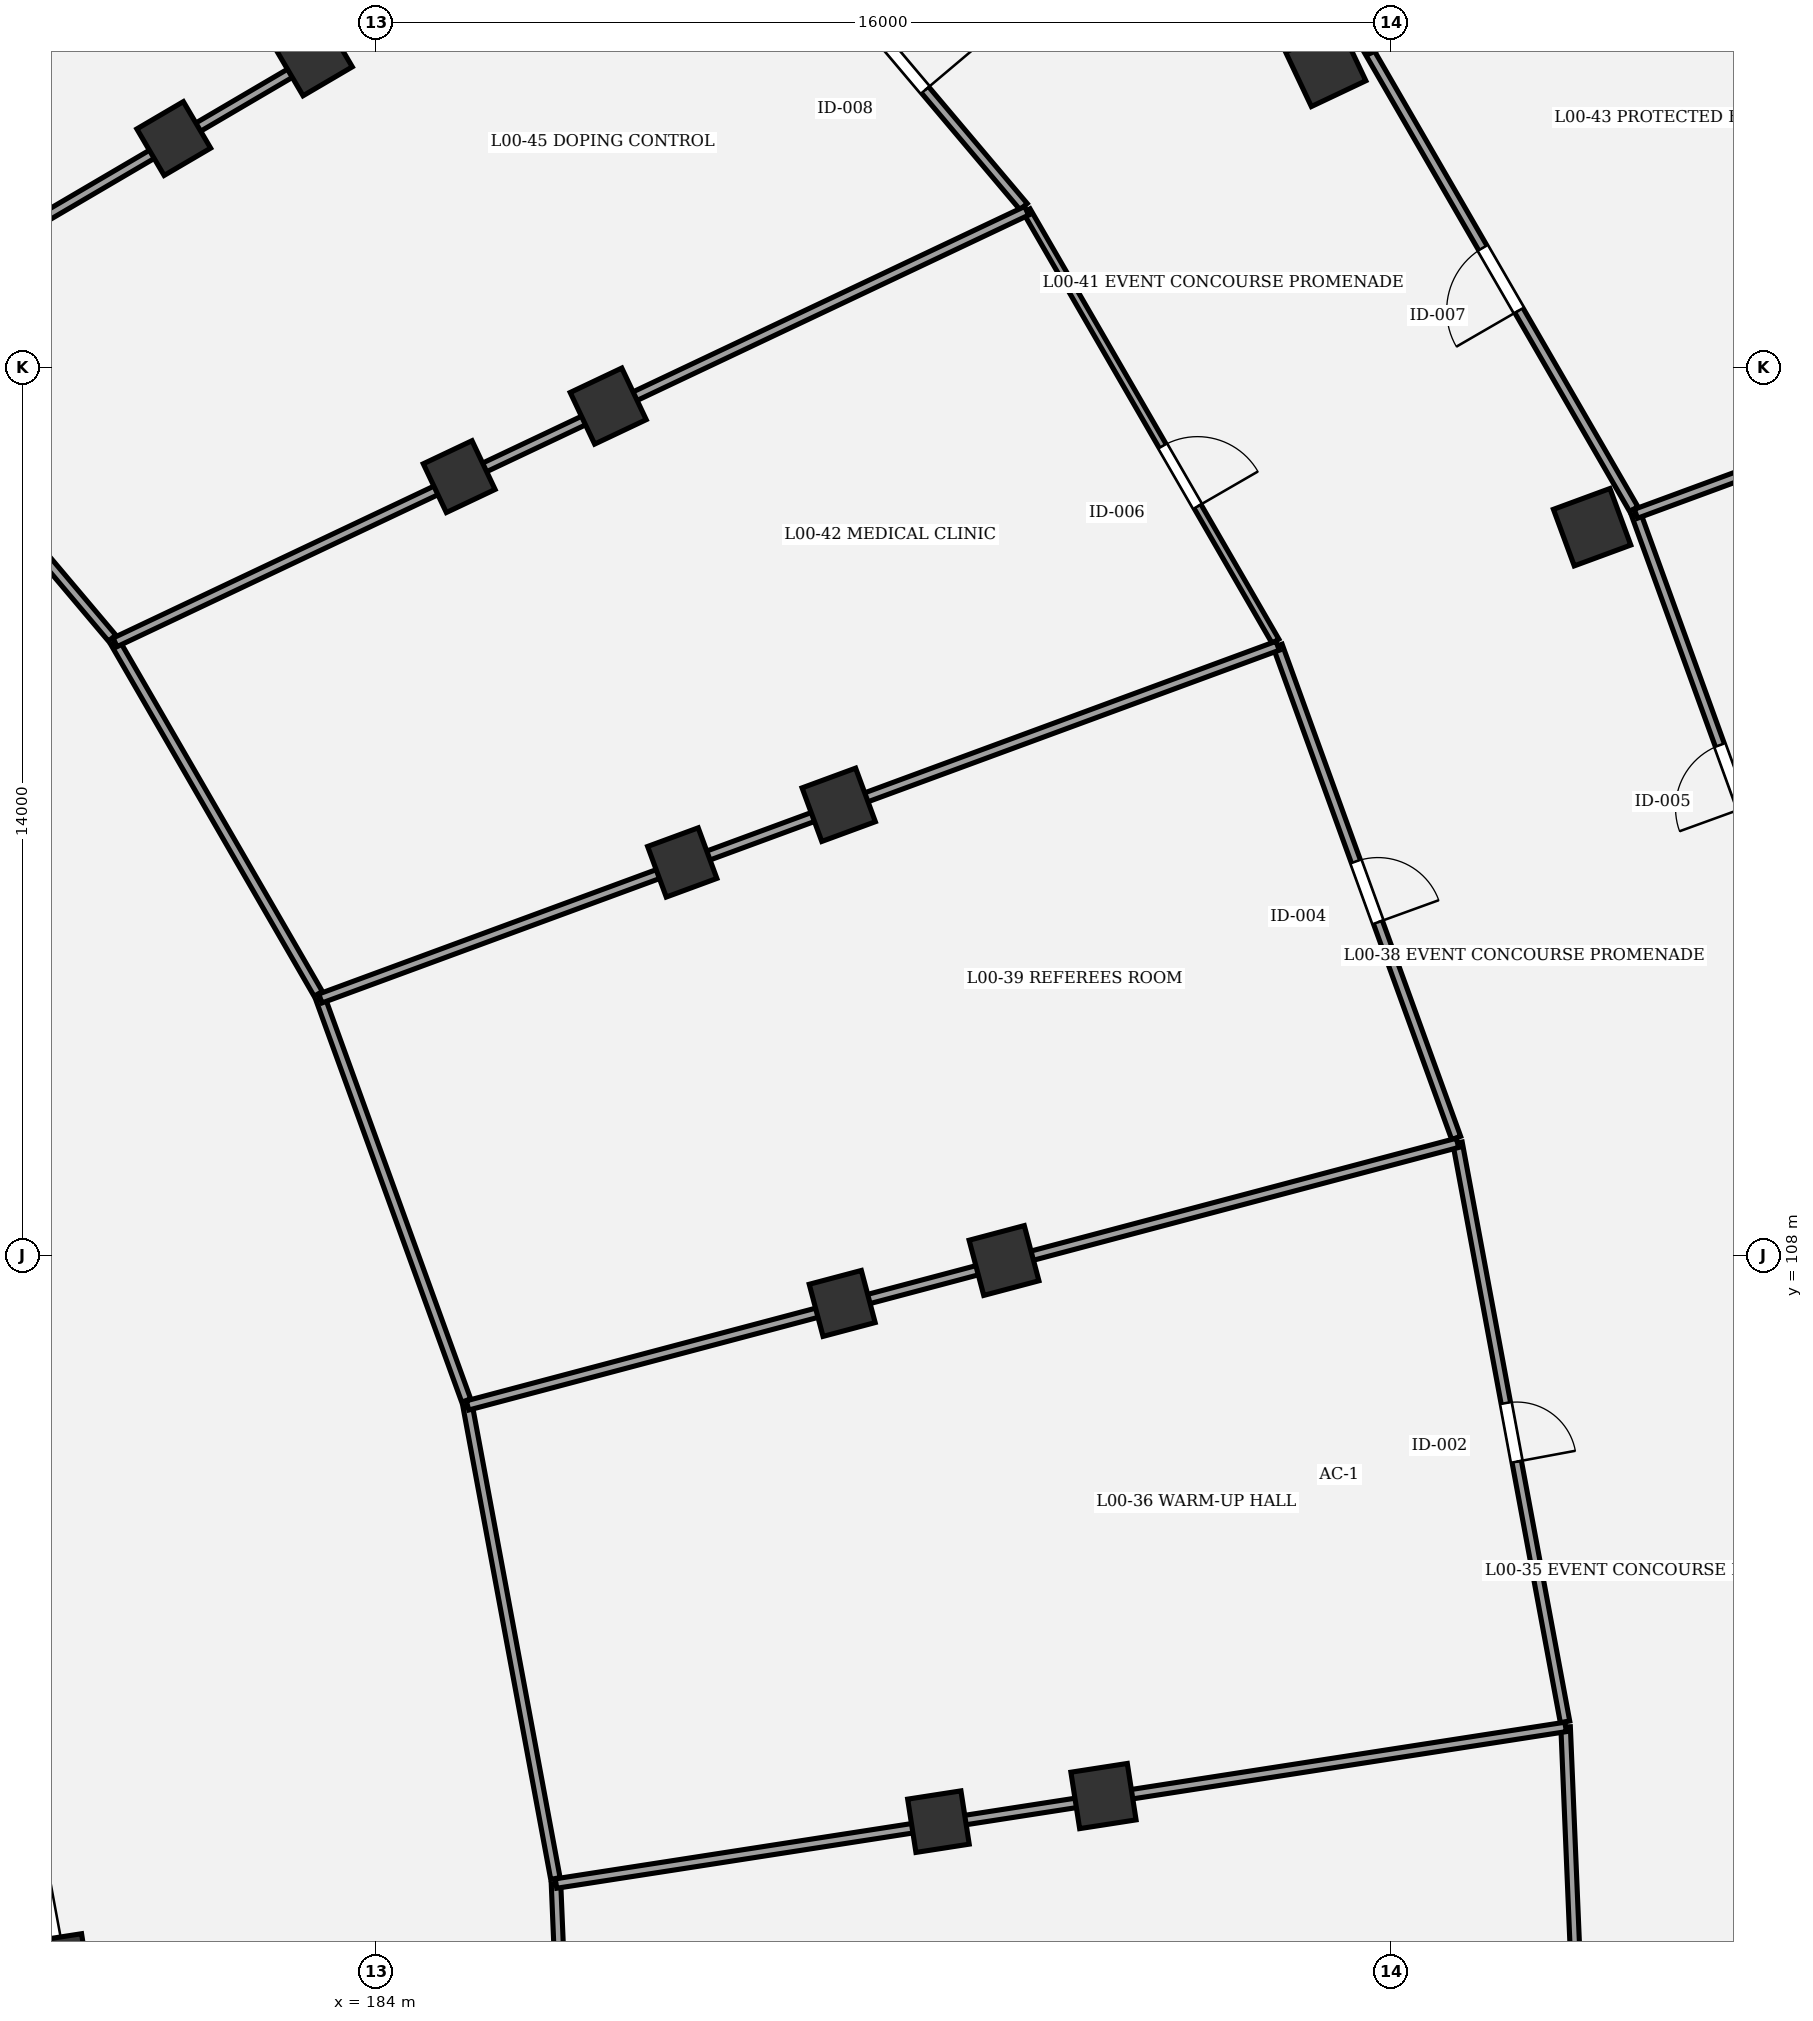
"""IFC4 building model, lengths in metres.
Left out: names, types, materials, properties, quantities, classifications, styles, units other than length and angle.
Written with IfcOpenShell. Run it as: python <this file> out.ifc"""

import sys

from ifc_helpers import new_model, si_unit, direction, frame, frame_2d, origin, origin_2d, place, context, subcontext, project, spatial, rectangle, extrude, element, fill, save


model = new_model("IFC4")
c1 = context("Model", 3, precision=1e-05, world=origin(), true_north=direction((0.0, 1.0)))
c2 = subcontext(c1, "Body", "Model", "MODEL_VIEW")
j1 = project(units=[si_unit("LENGTHUNIT", "METRE"), si_unit("PLANEANGLEUNIT", "RADIAN")], contexts=[c1])
p1 = place(None, origin())
s1 = spatial("IfcSite", under=j1, at=p1, CompositionType="ELEMENT")
p2 = place(p1, origin())
s2 = spatial("IfcBuilding", under=s1, at=p2, CompositionType="ELEMENT")
p3 = place(p2, origin())
s3 = spatial("IfcBuildingStorey", under=s2, at=p3, CompositionType="ELEMENT", Elevation=0.0)
p4 = place(p3, frame((179.088, 96.94, 0.0), z_axis=(0.0, 0.0, 1.0), x_axis=(0.98817491911, 0.153330783737, 0.0)))
e1 = element("IfcColumn", 1, at=p4, inside=s3, PredefinedType="COLUMN", context=c2, shape_type="SweptSolid", body=[
    extrude(rectangle(XDim=0.65, YDim=0.65, at=origin_2d()), origin(), (0.0, 0.0, 1.0), 1.15),
])
p5 = place(p3, frame((192.869, 99.078, 0.0), z_axis=(0.0, 0.0, 1.0), x_axis=(0.98817491911, 0.153330783737, 0.0)))
e2 = element("IfcColumn", 2, at=p5, inside=s3, PredefinedType="COLUMN", context=c2, shape_type="SweptSolid", body=[
    extrude(rectangle(XDim=0.85, YDim=0.85, at=origin_2d()), origin(), (0.0, 0.0, 1.0), 5.4),
])
p6 = place(p3, frame((195.471, 99.482, 0.0), z_axis=(0.0, 0.0, 1.0), x_axis=(0.98817491911, 0.153330783737, 0.0)))
e3 = element("IfcColumn", 3, at=p6, inside=s3, PredefinedType="COLUMN", context=c2, shape_type="SweptSolid", body=[
    extrude(rectangle(XDim=0.9, YDim=0.9, at=origin_2d()), origin(), (0.0, 0.0, 1.0), 5.4),
])
p7 = place(p3, frame((191.352, 107.248, 0.0), z_axis=(0.0, 0.0, 1.0), x_axis=(0.966600102017, 0.256289373133, 0.0)))
e4 = element("IfcColumn", 4, at=p7, inside=s3, PredefinedType="COLUMN", context=c2, shape_type="SweptSolid", body=[
    extrude(rectangle(XDim=0.85, YDim=0.85, at=origin_2d()), origin(), (0.0, 0.0, 1.0), 5.4),
])
p8 = place(p3, frame((193.903, 107.924, 0.0), z_axis=(0.0, 0.0, 1.0), x_axis=(0.966600102017, 0.256289373133, 0.0)))
e5 = element("IfcColumn", 5, at=p8, inside=s3, PredefinedType="COLUMN", context=c2, shape_type="SweptSolid", body=[
    extrude(rectangle(XDim=0.9, YDim=0.9, at=origin_2d()), origin(), (0.0, 0.0, 1.0), 5.4),
])
p9 = place(p3, frame((188.83, 114.199, 0.0), z_axis=(0.0, 0.0, 1.0), x_axis=(0.938372433776, 0.34562577382, 0.0)))
e6 = element("IfcColumn", 6, at=p9, inside=s3, PredefinedType="COLUMN", context=c2, shape_type="SweptSolid", body=[
    extrude(rectangle(XDim=0.85, YDim=0.85, at=origin_2d()), origin(), (0.0, 0.0, 1.0), 5.4),
])
p10 = place(p3, frame((191.297, 115.108, 0.0), z_axis=(0.0, 0.0, 1.0), x_axis=(0.938372433776, 0.34562577382, 0.0)))
e7 = element("IfcColumn", 7, at=p10, inside=s3, PredefinedType="COLUMN", context=c2, shape_type="SweptSolid", body=[
    extrude(rectangle(XDim=0.9, YDim=0.9, at=origin_2d()), origin(), (0.0, 0.0, 1.0), 5.4),
])
p11 = place(p3, frame((203.176, 119.484, 0.0), z_axis=(0.0, 0.0, 1.0), x_axis=(0.938372433776, 0.34562577382, 0.0)))
e8 = element("IfcColumn", 8, at=p11, inside=s3, PredefinedType="COLUMN", context=c2, shape_type="SweptSolid", body=[
    extrude(rectangle(XDim=0.95, YDim=0.95, at=origin_2d()), origin(), (0.0, 0.0, 1.0), 5.4),
])
p12 = place(p3, frame((185.313, 120.281, 0.0), z_axis=(0.0, 0.0, 1.0), x_axis=(0.903858661687, 0.4278311813, 0.0)))
e9 = element("IfcColumn", 9, at=p12, inside=s3, PredefinedType="COLUMN", context=c2, shape_type="SweptSolid", body=[
    extrude(rectangle(XDim=0.85, YDim=0.85, at=origin_2d()), origin(), (0.0, 0.0, 1.0), 5.4),
])
p13 = place(p3, frame((187.663, 121.394, 0.0), z_axis=(0.0, 0.0, 1.0), x_axis=(0.903858661687, 0.4278311813, 0.0)))
e10 = element("IfcColumn", 10, at=p13, inside=s3, PredefinedType="COLUMN", context=c2, shape_type="SweptSolid", body=[
    extrude(rectangle(XDim=0.9, YDim=0.9, at=origin_2d()), origin(), (0.0, 0.0, 1.0), 5.4),
])
p14 = place(p3, frame((198.976, 126.748, 0.0), z_axis=(0.0, 0.0, 1.0), x_axis=(0.903858661687, 0.4278311813, 0.0)))
e11 = element("IfcColumn", 11, at=p14, inside=s3, PredefinedType="COLUMN", context=c2, shape_type="SweptSolid", body=[
    extrude(rectangle(XDim=0.95, YDim=0.95, at=origin_2d()), origin(), (0.0, 0.0, 1.0), 5.4),
])
p15 = place(p3, frame((180.812, 125.611, 0.0), z_axis=(0.0, 0.0, 1.0), x_axis=(0.862513669207, 0.506033764121, 0.0)))
e12 = element("IfcColumn", 12, at=p15, inside=s3, PredefinedType="COLUMN", context=c2, shape_type="SweptSolid", body=[
    extrude(rectangle(XDim=0.85, YDim=0.85, at=origin_2d()), origin(), (0.0, 0.0, 1.0), 5.4),
])
p16 = place(p3, frame((183.012, 126.902, 0.0), z_axis=(0.0, 0.0, 1.0), x_axis=(0.862513669207, 0.506033764121, 0.0)))
e13 = element("IfcColumn", 13, at=p16, inside=s3, PredefinedType="COLUMN", context=c2, shape_type="SweptSolid", body=[
    extrude(rectangle(XDim=0.9, YDim=0.9, at=origin_2d()), origin(), (0.0, 0.0, 1.0), 5.4),
])
p17 = place(p3, frame((202.758, 100.571, 0.0), z_axis=(0.0, 0.0, 1.0), x_axis=(0.041894479342, -0.999122040894, 0.0)))
e14 = element("IfcWall", 14, at=p17, inside=s3, PredefinedType="PARTITIONING", context=c2, shape_type="SweptSolid", body=[
    extrude(rectangle(XDim=13.543, YDim=0.15, at=frame_2d((6.771, 0.0))), origin(), (0.0, 0.0, 1.0), 4.15),
])
p18 = place(p17, frame((6.322, 0.0, 0.0)))
e15 = element("IfcOpeningElement", 15, at=p18, cuts=e14, PredefinedType="OPENING", context=c2, shape_type="SweptSolid", body=[
    extrude(rectangle(XDim=0.9, YDim=2.1, at=frame_2d((0.45, 1.05))), frame((0.0, 0.085, 0.0), z_axis=(0.0, -1.0, 0.0), x_axis=(1.0, 0.0, 0.0)), (0.0, 0.0, 1.0), 0.17),
])
p19 = place(p3, frame((201.053, 109.779, 0.0), z_axis=(0.0, 0.0, 1.0), x_axis=(0.182600545941, -0.983187184936, 0.0)))
e16 = element("IfcWall", 16, at=p19, inside=s3, PredefinedType="PARTITIONING", context=c2, shape_type="SweptSolid", body=[
    extrude(rectangle(XDim=9.284, YDim=0.15, at=frame_2d((4.642, 0.0))), origin(), (0.0, 0.0, 1.0), 4.15),
])
p20 = place(p19, frame((4.172, 0.0, 0.0)))
e17 = element("IfcOpeningElement", 17, at=p20, cuts=e16, PredefinedType="OPENING", context=c2, shape_type="SweptSolid", body=[
    extrude(rectangle(XDim=0.94, YDim=2.1, at=frame_2d((0.47, 1.05))), frame((0.0, 0.085, 0.0), z_axis=(0.0, -1.0, 0.0), x_axis=(1.0, 0.0, 0.0)), (0.0, 0.0, 1.0), 0.17),
])
p21 = place(p3, frame((198.218, 117.615, 0.0), z_axis=(0.0, 0.0, 1.0), x_axis=(0.341044733968, -0.940047067669, 0.0)))
e18 = element("IfcWall", 18, at=p21, inside=s3, PredefinedType="PARTITIONING", context=c2, shape_type="SweptSolid", body=[
    extrude(rectangle(XDim=8.254, YDim=0.15, at=frame_2d((4.127, 0.0))), origin(), (0.0, 0.0, 1.0), 4.15),
])
p22 = place(p21, frame((3.617, 0.0, 0.0)))
e19 = element("IfcOpeningElement", 19, at=p22, cuts=e18, PredefinedType="OPENING", context=c2, shape_type="SweptSolid", body=[
    extrude(rectangle(XDim=1.02, YDim=2.1, at=frame_2d((0.51, 1.05))), frame((0.0, 0.085, 0.0), z_axis=(0.0, -1.0, 0.0), x_axis=(1.0, 0.0, 0.0)), (0.0, 0.0, 1.0), 0.17),
])
p23 = place(p3, frame((206.874, 111.405, 0.0), z_axis=(0.0, 0.0, 1.0), x_axis=(-0.341031741571, 0.940051781149, 0.0)))
e20 = element("IfcWall", 20, at=p23, inside=s3, PredefinedType="PARTITIONING", context=c2, shape_type="SweptSolid", body=[
    extrude(rectangle(XDim=8.82, YDim=0.15, at=frame_2d((4.41, 0.0))), origin(), (0.0, 0.0, 1.0), 4.15),
])
p24 = place(p23, frame((3.88, 0.0, 0.0)))
e21 = element("IfcOpeningElement", 21, at=p24, cuts=e20, PredefinedType="OPENING", context=c2, shape_type="SweptSolid", body=[
    extrude(rectangle(XDim=1.06, YDim=2.1, at=frame_2d((0.53, 1.05))), frame((0.0, 0.085, 0.0), z_axis=(0.0, -1.0, 0.0), x_axis=(1.0, 0.0, 0.0)), (0.0, 0.0, 1.0), 0.17),
])
p25 = place(p3, frame((194.26, 124.472, 0.0), z_axis=(0.0, 0.0, 1.0), x_axis=(0.500584301803, -0.865687794063, 0.0)))
e22 = element("IfcWall", 22, at=p25, inside=s3, PredefinedType="PARTITIONING", context=c2, shape_type="SweptSolid", body=[
    extrude(rectangle(XDim=7.837, YDim=0.125, at=frame_2d((3.918, 0.0))), origin(), (0.0, 0.0, 1.0), 4.15),
])
p26 = place(p25, frame((4.283, 0.0, 0.0)))
e23 = element("IfcOpeningElement", 23, at=p26, cuts=e22, PredefinedType="OPENING", context=c2, shape_type="SweptSolid", body=[
    extrude(rectangle(XDim=1.1, YDim=2.1, at=frame_2d((0.55, 1.05))), frame((0.0, 0.073, 0.0), z_axis=(0.0, -1.0, 0.0), x_axis=(1.0, 0.0, 0.0)), (0.0, 0.0, 1.0), 0.145),
])
p27 = place(p3, frame((203.833, 119.769, 0.0), z_axis=(0.0, 0.0, 1.0), x_axis=(-0.500559280672, 0.865702262059, 0.0)))
e24 = element("IfcWall", 24, at=p27, inside=s3, PredefinedType="PARTITIONING", context=c2, shape_type="SweptSolid", body=[
    extrude(rectangle(XDim=8.375, YDim=0.15, at=frame_2d((4.187, 0.0))), origin(), (0.0, 0.0, 1.0), 4.15),
])
p28 = place(p27, frame((3.617, 0.0, 0.0)))
e25 = element("IfcOpeningElement", 25, at=p28, cuts=e24, PredefinedType="OPENING", context=c2, shape_type="SweptSolid", body=[
    extrude(rectangle(XDim=1.14, YDim=2.1, at=frame_2d((0.57, 1.05))), frame((0.0, 0.085, 0.0), z_axis=(0.0, -1.0, 0.0), x_axis=(1.0, 0.0, 0.0)), (0.0, 0.0, 1.0), 0.17),
])
p29 = place(p3, frame((189.193, 130.482, 0.0), z_axis=(0.0, 0.0, 1.0), x_axis=(0.645180817826, -0.764029915847, 0.0)))
e26 = element("IfcWall", 26, at=p29, inside=s3, PredefinedType="PARTITIONING", context=c2, shape_type="SweptSolid", body=[
    extrude(rectangle(XDim=7.779, YDim=0.15, at=frame_2d((3.89, 0.0))), origin(), (0.0, 0.0, 1.0), 4.15),
])
p30 = place(p29, frame((4.194, 0.0, 0.0)))
e27 = element("IfcOpeningElement", 27, at=p30, cuts=e26, PredefinedType="OPENING", context=c2, shape_type="SweptSolid", body=[
    extrude(rectangle(XDim=1.18, YDim=2.1, at=frame_2d((0.59, 1.05))), frame((0.0, 0.085, 0.0), z_axis=(0.0, -1.0, 0.0), x_axis=(1.0, 0.0, 0.0)), (0.0, 0.0, 1.0), 0.17),
])
p31 = place(p3, frame((187.303, 87.04, 0.0), z_axis=(0.0, 0.0, 1.0), x_axis=(-0.041917617243, 0.999121070424, 0.0)))
e28 = element("IfcWall", 28, at=p31, inside=s3, PredefinedType="PARTITIONING", context=c2, shape_type="SweptSolid", body=[
    extrude(rectangle(XDim=11.072, YDim=0.15, at=frame_2d((5.536, 0.0))), origin(), (0.0, 0.0, 1.0), 4.15),
])
p32 = place(p3, frame((186.839, 98.102, 0.0), z_axis=(0.0, 0.0, 1.0), x_axis=(0.988184353902, 0.153269966734, 0.0)))
e29 = element("IfcWall", 29, at=p32, inside=s3, PredefinedType="PARTITIONING", context=c2, shape_type="SweptSolid", body=[
    extrude(rectangle(XDim=16.109, YDim=0.15, at=frame_2d((8.054, 0.0))), origin(), (0.0, 0.0, 1.0), 4.15),
])
p33 = place(p3, frame((186.83, 98.182, 0.0), z_axis=(0.0, 0.0, 1.0), x_axis=(-0.182622862121, 0.983183040044, 0.0)))
e30 = element("IfcWall", 30, at=p33, inside=s3, PredefinedType="PARTITIONING", context=c2, shape_type="SweptSolid", body=[
    extrude(rectangle(XDim=7.585, YDim=0.15, at=frame_2d((3.792, 0.0))), origin(), (0.0, 0.0, 1.0), 4.15),
])
p34 = place(p3, frame((185.445, 105.64, 0.0), z_axis=(0.0, 0.0, 1.0), x_axis=(0.966587096108, 0.256338420135, 0.0)))
e31 = element("IfcWall", 31, at=p34, inside=s3, PredefinedType="PARTITIONING", context=c2, shape_type="SweptSolid", body=[
    extrude(rectangle(XDim=16.148, YDim=0.15, at=frame_2d((8.074, 0.0))), origin(), (0.0, 0.0, 1.0), 4.15),
])
p35 = place(p3, frame((185.424, 105.717, 0.0), z_axis=(0.0, 0.0, 1.0), x_axis=(-0.341039355212, 0.940049019039, 0.0)))
e32 = element("IfcWall", 32, at=p35, inside=s3, PredefinedType="PARTITIONING", context=c2, shape_type="SweptSolid", body=[
    extrude(rectangle(XDim=6.742, YDim=0.15, at=frame_2d((3.371, 0.0))), origin(), (0.0, 0.0, 1.0), 4.15),
])
p36 = place(p3, frame((183.125, 112.055, 0.0), z_axis=(0.0, 0.0, 1.0), x_axis=(0.938343894245, 0.345703248659, 0.0)))
e33 = element("IfcWall", 33, at=p36, inside=s3, PredefinedType="PARTITIONING", context=c2, shape_type="SweptSolid", body=[
    extrude(rectangle(XDim=16.085, YDim=0.15, at=frame_2d((8.042, 0.0))), origin(), (0.0, 0.0, 1.0), 4.15),
])
p37 = place(p3, frame((203.866, 119.696, 0.0), z_axis=(0.0, 0.0, 1.0), x_axis=(0.938346807893, 0.345695340028, 0.0)))
e34 = element("IfcWall", 34, at=p37, inside=s3, PredefinedType="PARTITIONING", context=c2, shape_type="SweptSolid", body=[
    extrude(rectangle(XDim=7.905, YDim=0.15, at=frame_2d((3.952, 0.0))), origin(), (0.0, 0.0, 1.0), 4.15),
])
p38 = place(p3, frame((183.091, 112.128, 0.0), z_axis=(0.0, 0.0, 1.0), x_axis=(-0.500568608351, 0.865696868617, 0.0)))
e35 = element("IfcWall", 35, at=p38, inside=s3, PredefinedType="PARTITIONING", context=c2, shape_type="SweptSolid", body=[
    extrude(rectangle(XDim=6.401, YDim=0.15, at=frame_2d((3.2, 0.0))), origin(), (0.0, 0.0, 1.0), 4.15),
])
p39 = place(p3, frame((179.887, 117.669, 0.0), z_axis=(0.0, 0.0, 1.0), x_axis=(0.903858162526, 0.427832235854, 0.0)))
e36 = element("IfcWall", 36, at=p39, inside=s3, PredefinedType="PARTITIONING", context=c2, shape_type="SweptSolid", body=[
    extrude(rectangle(XDim=15.902, YDim=0.15, at=frame_2d((7.951, 0.0))), origin(), (0.0, 0.0, 1.0), 4.15),
])
p40 = place(p3, frame((199.641, 127.019, 0.0), z_axis=(0.0, 0.0, 1.0), x_axis=(0.903854859666, 0.427839213559, 0.0)))
e37 = element("IfcWall", 37, at=p40, inside=s3, PredefinedType="PARTITIONING", context=c2, shape_type="SweptSolid", body=[
    extrude(rectangle(XDim=7.814, YDim=0.15, at=frame_2d((3.907, 0.0))), origin(), (0.0, 0.0, 1.0), 4.15),
])
p41 = place(p3, frame((179.842, 117.736, 0.0), z_axis=(0.0, 0.0, 1.0), x_axis=(-0.645182313149, 0.764028653127, 0.0)))
e38 = element("IfcWall", 38, at=p41, inside=s3, PredefinedType="PARTITIONING", context=c2, shape_type="SweptSolid", body=[
    extrude(rectangle(XDim=6.354, YDim=0.15, at=frame_2d((3.177, 0.0))), origin(), (0.0, 0.0, 1.0), 4.15),
])
p42 = place(p3, frame((175.742, 122.59, 0.0), z_axis=(0.0, 0.0, 1.0), x_axis=(0.86252080612, 0.506021599351, 0.0)))
e39 = element("IfcWall", 39, at=p42, inside=s3, PredefinedType="PARTITIONING", context=c2, shape_type="SweptSolid", body=[
    extrude(rectangle(XDim=15.595, YDim=0.15, at=frame_2d((7.797, 0.0))), origin(), (0.0, 0.0, 1.0), 4.15),
])
p43 = place(p3, frame((170.698, 126.858, 0.0), z_axis=(0.0, 0.0, 1.0), x_axis=(0.812883175227, 0.582426770876, 0.0)))
e40 = element("IfcWall", 40, at=p43, inside=s3, PredefinedType="PARTITIONING", context=c2, shape_type="SweptSolid", body=[
    extrude(rectangle(XDim=15.167, YDim=0.15, at=frame_2d((7.583, 0.0))), origin(), (0.0, 0.0, 1.0), 4.15),
])
p44 = place(p20, origin())
e41 = element("IfcDoor", 41, at=p44, inside=s3, OperationType="SINGLE_SWING_RIGHT", PredefinedType="DOOR", context=c2, shape_type="SweptSolid", body=[
    extrude(rectangle(XDim=0.94, YDim=2.1, at=frame_2d((0.47, 1.05))), frame((0.0, 0.025, 0.0), z_axis=(0.0, -1.0, 0.0), x_axis=(1.0, 0.0, 0.0)), (0.0, 0.0, 1.0), 0.05),
])
fill(e17, e41)
p45 = place(p22, origin())
e42 = element("IfcDoor", 42, at=p45, inside=s3, OperationType="SINGLE_SWING_RIGHT", PredefinedType="DOOR", context=c2, shape_type="SweptSolid", body=[
    extrude(rectangle(XDim=1.02, YDim=2.1, at=frame_2d((0.51, 1.05))), frame((0.0, 0.025, 0.0), z_axis=(0.0, -1.0, 0.0), x_axis=(1.0, 0.0, 0.0)), (0.0, 0.0, 1.0), 0.05),
])
fill(e19, e42)
p46 = place(p24, origin())
e43 = element("IfcDoor", 43, at=p46, inside=s3, OperationType="SINGLE_SWING_LEFT", PredefinedType="DOOR", context=c2, shape_type="SweptSolid", body=[
    extrude(rectangle(XDim=1.06, YDim=2.1, at=frame_2d((0.53, 1.05))), frame((0.0, 0.025, 0.0), z_axis=(0.0, -1.0, 0.0), x_axis=(1.0, 0.0, 0.0)), (0.0, 0.0, 1.0), 0.05),
])
fill(e21, e43)
p47 = place(p26, origin())
e44 = element("IfcDoor", 44, at=p47, inside=s3, OperationType="SINGLE_SWING_RIGHT", PredefinedType="DOOR", context=c2, shape_type="SweptSolid", body=[
    extrude(rectangle(XDim=1.1, YDim=2.1, at=frame_2d((0.55, 1.05))), frame((0.0, 0.025, 0.0), z_axis=(0.0, -1.0, 0.0), x_axis=(1.0, 0.0, 0.0)), (0.0, 0.0, 1.0), 0.05),
])
fill(e23, e44)
p48 = place(p28, origin())
e45 = element("IfcDoor", 45, at=p48, inside=s3, OperationType="SINGLE_SWING_LEFT", PredefinedType="DOOR", context=c2, shape_type="SweptSolid", body=[
    extrude(rectangle(XDim=1.14, YDim=2.1, at=frame_2d((0.57, 1.05))), frame((0.0, 0.025, 0.0), z_axis=(0.0, -1.0, 0.0), x_axis=(1.0, 0.0, 0.0)), (0.0, 0.0, 1.0), 0.05),
])
fill(e25, e45)
p49 = place(p30, origin())
e46 = element("IfcDoor", 46, at=p49, inside=s3, OperationType="SINGLE_SWING_RIGHT", PredefinedType="DOOR", context=c2, shape_type="SweptSolid", body=[
    extrude(rectangle(XDim=1.18, YDim=2.1, at=frame_2d((0.59, 1.05))), frame((0.0, 0.025, 0.0), z_axis=(0.0, -1.0, 0.0), x_axis=(1.0, 0.0, 0.0)), (0.0, 0.0, 1.0), 0.05),
])
fill(e27, e46)
save(model, sys.argv[1])
